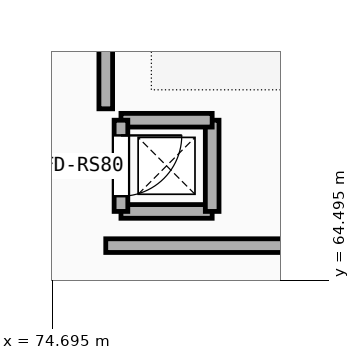
"""IFC4 building model, lengths in metres.
Left out: names, types, materials, properties, quantities, classifications, styles, units other than length and angle.
Written with IfcOpenShell. Run it as: python <this file> out.ifc"""

import sys

from ifc_helpers import new_model, si_unit, direction, frame, frame_2d, origin, place, context, subcontext, project, spatial, rectangle, extrude, element, fill, save


model = new_model("IFC4")
c1 = context("Model", 3, precision=1e-05, world=origin(), true_north=direction((0.0, 1.0)))
c2 = subcontext(c1, "Body", "Model", "MODEL_VIEW")
j1 = project(units=[si_unit("LENGTHUNIT", "METRE"), si_unit("PLANEANGLEUNIT", "RADIAN")], contexts=[c1])
p1 = place(None, origin())
s1 = spatial("IfcSite", under=j1, at=p1, CompositionType="ELEMENT")
p2 = place(p1, origin())
s2 = spatial("IfcBuilding", under=s1, at=p2, CompositionType="ELEMENT")
p3 = place(p2, frame((0.0, 0.0, 21.6)))
s3 = spatial("IfcBuildingStorey", under=s2, at=p3, CompositionType="ELEMENT", Elevation=21.6)
p4 = place(p3, frame((75.4, 64.95, 0.0), z_axis=(0.0, 0.0, 1.0), x_axis=(1.0, 0.0, 0.0)))
e1 = element("IfcWall", 1, at=p4, inside=s3, PredefinedType="PARTITIONING", context=c2, shape_type="SweptSolid", body=[
    extrude(rectangle(XDim=11.26, YDim=0.18, at=frame_2d((5.63, 0.0))), origin(), (0.0, 0.0, 1.0), 2.79),
])
p5 = place(p3, frame((75.4, 66.75, 0.0), z_axis=(0.0, 0.0, 1.0), x_axis=(0.0, 1.0, 0.0)))
e2 = element("IfcWall", 2, at=p5, inside=s3, PredefinedType="PARTITIONING", context=c2, shape_type="SweptSolid", body=[
    extrude(rectangle(XDim=30.75, YDim=0.18, at=frame_2d((15.375, 0.0))), origin(), (0.0, 0.0, 1.0), 2.71),
])
p6 = place(p5, frame((6.413, 0.0, -0.01)))
e3 = element("IfcOpeningElement", 3, at=p6, cuts=e2, PredefinedType="OPENING", context=c2, shape_type="SweptSolid", body=[
    extrude(rectangle(XDim=1.6, YDim=2.21, at=frame_2d((0.8, 1.105))), frame((0.0, 0.1, 0.0), z_axis=(0.0, -1.0, 0.0), x_axis=(1.0, 0.0, 0.0)), (0.0, 0.0, 1.0), 0.2),
])
p7 = place(p3, frame((75.6, 65.4, 0.0), z_axis=(0.0, 0.0, 1.0), x_axis=(1.0, 0.0, 0.0)))
e4 = element("IfcWall", 4, at=p7, inside=s3, PredefinedType="SOLIDWALL", context=c2, shape_type="SweptSolid", body=[
    extrude(rectangle(XDim=1.2, YDim=0.18, at=frame_2d((0.6, 0.0))), origin(), (0.0, 0.0, 1.0), 3.35),
])
p8 = place(p3, frame((76.8, 65.4, 0.0), z_axis=(0.0, 0.0, 1.0), x_axis=(0.0, 1.0, 0.0)))
e5 = element("IfcWall", 5, at=p8, inside=s3, PredefinedType="SOLIDWALL", context=c2, shape_type="SweptSolid", body=[
    extrude(rectangle(XDim=1.2, YDim=0.18, at=frame_2d((0.6, 0.0))), origin(), (0.0, 0.0, 1.0), 3.35),
])
p9 = place(p3, frame((76.8, 66.6, 0.0), z_axis=(0.0, 0.0, 1.0), x_axis=(-1.0, 0.0, 0.0)))
e6 = element("IfcWall", 6, at=p9, inside=s3, PredefinedType="SOLIDWALL", context=c2, shape_type="SweptSolid", body=[
    extrude(rectangle(XDim=1.2, YDim=0.18, at=frame_2d((0.6, 0.0))), origin(), (0.0, 0.0, 1.0), 3.35),
])
p10 = place(p3, frame((75.6, 66.6, 0.0), z_axis=(0.0, 0.0, 1.0), x_axis=(0.0, -1.0, 0.0)))
e7 = element("IfcWall", 7, at=p10, inside=s3, PredefinedType="SOLIDWALL", context=c2, shape_type="SweptSolid", body=[
    extrude(rectangle(XDim=1.2, YDim=0.18, at=frame_2d((0.6, 0.0))), origin(), (0.0, 0.0, 1.0), 3.35),
])
p11 = place(p10, frame((0.2, 0.0, -0.01)))
e8 = element("IfcOpeningElement", 8, at=p11, cuts=e7, PredefinedType="OPENING", context=c2, shape_type="SweptSolid", body=[
    extrude(rectangle(XDim=0.8, YDim=2.06, at=frame_2d((0.4, 1.03))), frame((0.0, 0.1, 0.0), z_axis=(0.0, -1.0, 0.0), x_axis=(1.0, 0.0, 0.0)), (0.0, 0.0, 1.0), 0.2),
])
p12 = place(p11, frame((0.0, 0.0, 0.01)))
e9 = element("IfcDoor", 9, at=p12, inside=s3, OperationType="SINGLE_SWING_LEFT", PredefinedType="DOOR", context=c2, shape_type="SweptSolid", body=[
    extrude(rectangle(XDim=0.8, YDim=2.05, at=frame_2d((0.4, 1.025))), frame((0.0, 0.025, 0.0), z_axis=(0.0, -1.0, 0.0), x_axis=(1.0, 0.0, 0.0)), (0.0, 0.0, 1.0), 0.05),
])
fill(e8, e9)
save(model, sys.argv[1])
